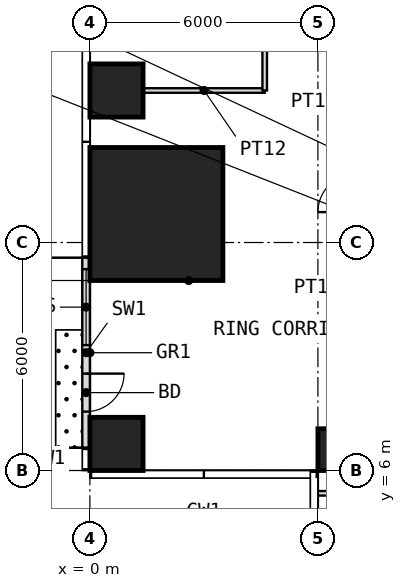
"""IFC4 building model, lengths in metres.
Left out: names, types, materials, properties, quantities, classifications, styles, units other than length and angle.
Written with IfcOpenShell. Run it as: python <this file> out.ifc"""

import sys

from ifc_helpers import new_model, si_unit, direction, frame, frame_2d, origin, origin_2d, place, context, subcontext, project, spatial, rectangle, extrude, element, fill, save


model = new_model("IFC4")
c1 = context("Model", 3, precision=1e-05, world=origin(), true_north=direction((0.0, 1.0)))
c2 = subcontext(c1, "Body", "Model", "MODEL_VIEW")
j1 = project(units=[si_unit("LENGTHUNIT", "METRE"), si_unit("PLANEANGLEUNIT", "RADIAN")], contexts=[c1])
p1 = place(None, origin())
s1 = spatial("IfcSite", under=j1, at=p1, CompositionType="ELEMENT")
p2 = place(p1, origin())
s2 = spatial("IfcBuilding", under=s1, at=p2, CompositionType="ELEMENT")
p3 = place(p2, frame((0.0, 0.0, 38.5)))
s3 = spatial("IfcBuildingStorey", under=s2, at=p3, CompositionType="ELEMENT", Elevation=38.5)
p4 = place(p3, frame((0.7, 6.7, 0.0), z_axis=(0.0, 0.0, 1.0), x_axis=(1.0, 0.0, 0.0)))
e1 = element("IfcColumn", 1, at=p4, inside=s3, PredefinedType="COLUMN", context=c2, shape_type="SweptSolid", body=[
    extrude(rectangle(XDim=1.4, YDim=1.4, at=origin_2d()), origin(), (0.0, 0.0, 1.0), 4.0),
])
p5 = place(p3, frame((6.55, 6.55, 0.0), z_axis=(0.0, 0.0, 1.0), x_axis=(1.0, 0.0, 0.0)))
e2 = element("IfcColumn", 2, at=p5, inside=s3, PredefinedType="COLUMN", context=c2, shape_type="SweptSolid", body=[
    extrude(rectangle(XDim=1.1, YDim=1.1, at=origin_2d()), origin(), (0.0, 0.0, 1.0), 4.0),
])
p6 = place(p3, frame((1.75, 12.75, 0.0), z_axis=(0.0, 0.0, 1.0), x_axis=(1.0, 0.0, 0.0)))
e3 = element("IfcColumn", 3, at=p6, inside=s3, PredefinedType="COLUMN", context=c2, shape_type="SweptSolid", body=[
    extrude(rectangle(XDim=3.5, YDim=3.5, at=origin_2d()), origin(), (0.0, 0.0, 1.0), 4.0),
])
p7 = place(p3, frame((0.7, 16.0, 0.0), z_axis=(0.0, 0.0, 1.0), x_axis=(1.0, 0.0, 0.0)))
e4 = element("IfcColumn", 4, at=p7, inside=s3, PredefinedType="COLUMN", context=c2, shape_type="SweptSolid", body=[
    extrude(rectangle(XDim=1.4, YDim=1.4, at=origin_2d()), origin(), (0.0, 0.0, 1.0), 4.0),
])
p8 = place(p3, frame((-0.1, 11.6, 0.0), z_axis=(0.0, 0.0, 1.0), x_axis=(0.0, -1.0, 0.0)))
e5 = element("IfcWall", 5, at=p8, inside=s3, PredefinedType="USERDEFINED", context=c2, shape_type="SweptSolid", body=[
    extrude(rectangle(XDim=5.0, YDim=0.2, at=frame_2d((2.5, 0.0))), origin(), (0.0, 0.0, 1.0), 3.75),
])
p9 = place(p8, frame((3.05, 0.0, 0.0)))
e6 = element("IfcOpeningElement", 6, at=p9, cuts=e5, PredefinedType="OPENING", context=c2, shape_type="SweptSolid", body=[
    extrude(rectangle(XDim=1.0, YDim=2.4, at=frame_2d((0.5, 1.2))), frame((0.0, 0.11, 0.0), z_axis=(0.0, -1.0, 0.0), x_axis=(1.0, 0.0, 0.0)), (0.0, 0.0, 1.0), 0.22),
])
p10 = place(p8, frame((0.3, 0.0, 0.3)))
e7 = element("IfcOpeningElement", 7, at=p10, cuts=e5, PredefinedType="OPENING", context=c2, shape_type="SweptSolid", body=[
    extrude(rectangle(XDim=2.0, YDim=2.7, at=frame_2d((1.0, 1.35))), frame((0.0, 0.11, 0.0), z_axis=(0.0, -1.0, 0.0), x_axis=(1.0, 0.0, 0.0)), (0.0, 0.0, 1.0), 0.22),
])
p11 = place(p3, frame((1.41, 16.0, 0.0), z_axis=(0.0, 0.0, 1.0), x_axis=(1.0, 0.0, 0.0)))
e8 = element("IfcWall", 8, at=p11, inside=s3, PredefinedType="PARTITIONING", context=c2, shape_type="SweptSolid", body=[
    extrude(rectangle(XDim=3.19, YDim=0.12, at=frame_2d((1.595, 0.0))), origin(), (0.0, 0.0, 1.0), 3.75),
])
p12 = place(p3, frame((4.6, 16.0, 0.0), z_axis=(0.0, 0.0, 1.0), x_axis=(0.0, 1.0, 0.0)))
e9 = element("IfcWall", 9, at=p12, inside=s3, PredefinedType="PARTITIONING", context=c2, shape_type="SweptSolid", body=[
    extrude(rectangle(XDim=5.0, YDim=0.12, at=frame_2d((2.5, 0.0))), origin(), (0.0, 0.0, 1.0), 3.75),
])
p13 = place(p12, frame((2.0, 0.0, 0.0)))
e10 = element("IfcOpeningElement", 10, at=p13, cuts=e9, PredefinedType="OPENING", context=c2, shape_type="SweptSolid", body=[
    extrude(rectangle(XDim=1.0, YDim=2.2, at=frame_2d((0.5, 1.1))), frame((0.0, 0.07, 0.0), z_axis=(0.0, -1.0, 0.0), x_axis=(1.0, 0.0, 0.0)), (0.0, 0.0, 1.0), 0.14),
])
p14 = place(p3, frame((6.0, 5.4, 0.0), z_axis=(0.0, 0.0, 1.0), x_axis=(1.0, 0.0, 0.0)))
e11 = element("IfcWall", 11, at=p14, inside=s3, PredefinedType="PARTITIONING", context=c2, shape_type="SweptSolid", body=[
    extrude(rectangle(XDim=27.0, YDim=0.12, at=frame_2d((13.5, 0.0))), origin(), (0.0, 0.0, 1.0), 3.75),
])
p15 = place(p14, frame((14.8, 0.0, 0.0)))
e12 = element("IfcOpeningElement", 12, at=p15, cuts=e11, PredefinedType="OPENING", context=c2, shape_type="SweptSolid", body=[
    extrude(rectangle(XDim=1.0, YDim=2.4, at=frame_2d((0.5, 1.2))), frame((0.0, 0.07, 0.0), z_axis=(0.0, -1.0, 0.0), x_axis=(1.0, 0.0, 0.0)), (0.0, 0.0, 1.0), 0.14),
])
p16 = place(p9, origin())
e13 = element("IfcDoor", 13, at=p16, inside=s3, OperationType="SINGLE_SWING_LEFT", PredefinedType="DOOR", context=c2, shape_type="SweptSolid", body=[
    extrude(rectangle(XDim=1.0, YDim=2.4, at=frame_2d((0.5, 1.2))), frame((0.0, 0.025, 0.0), z_axis=(0.0, -1.0, 0.0), x_axis=(1.0, 0.0, 0.0)), (0.0, 0.0, 1.0), 0.05),
])
fill(e6, e13)
p17 = place(p10, origin())
e14 = element("IfcWindow", 14, at=p17, inside=s3, PartitioningType="SINGLE_PANEL", PredefinedType="WINDOW", context=c2, shape_type="SweptSolid", body=[
    extrude(rectangle(XDim=2.0, YDim=2.7, at=frame_2d((1.0, 1.35))), frame((0.0, 0.03, 0.0), z_axis=(0.0, -1.0, 0.0), x_axis=(1.0, 0.0, 0.0)), (0.0, 0.0, 1.0), 0.06),
])
fill(e7, e14)
save(model, sys.argv[1])
